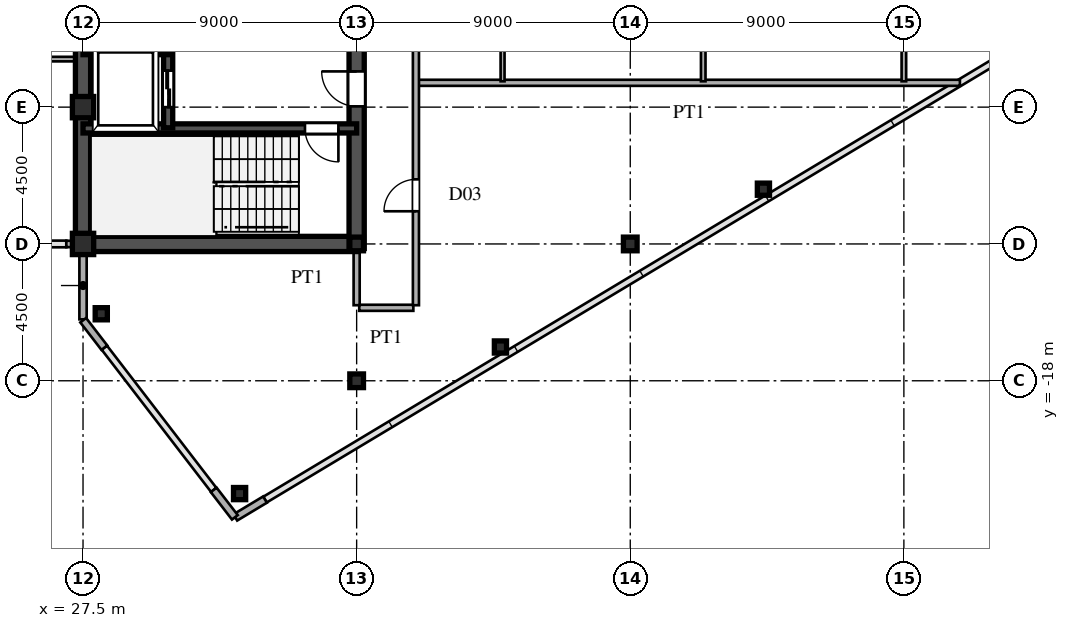
"""IFC4 building model, lengths in metres.
Left out: names, types, materials, properties, quantities, classifications, styles, units other than length and angle.
Written with IfcOpenShell. Run it as: python <this file> out.ifc"""

import sys

from ifc_helpers import new_model, si_unit, direction, frame, frame_2d, origin, origin_2d, place, context, subcontext, project, spatial, rectangle, hollow_rectangle, i_section, extrude, source, transform, mapped, element, fill, save


model = new_model("IFC4")
c1 = context("Model", 3, precision=1e-05, world=origin(), true_north=direction((0.0, 1.0)))
c2 = subcontext(c1, "Body", "Model", "MODEL_VIEW")
j1 = project(units=[si_unit("LENGTHUNIT", "METRE"), si_unit("PLANEANGLEUNIT", "RADIAN")], contexts=[c1])
p1 = place(None, origin())
s1 = spatial("IfcSite", under=j1, at=p1, CompositionType="ELEMENT")
p2 = place(p1, origin())
s2 = spatial("IfcBuilding", under=s1, at=p2, CompositionType="ELEMENT")
p3 = place(p2, frame((0.0, 0.0, 246.9)))
s3 = spatial("IfcBuildingStorey", under=s2, at=p3, CompositionType="ELEMENT", Elevation=246.9)
m1 = source(origin(), c2, "Body", "SweptSolid", [
    extrude(hollow_rectangle(XDim=0.7, YDim=0.7, WallThickness=0.03, at=origin_2d()), origin(), (0.0, 0.0, 1.0), 3.75),
])
for number, where, z_axis, x_axis in (
    (1, (27.5, -13.5, 0.0), (0.0, 0.0, 1.0), (1.0, 0.0, 0.0)),
    (2, (27.5, -9.0, 0.0), (0.0, 0.0, 1.0), (1.0, 0.0, 0.0)),
):
    element("IfcColumn", number, at=place(p3, frame(where, z_axis=z_axis, x_axis=x_axis)), inside=s3, PredefinedType="COLUMN", context=c2, shape_type="MappedRepresentation", body=[
        mapped(m1, transform((0.0, 0.0, 0.0), scale=1.0)),
    ])
m2 = source(origin(), c2, "Body", "SweptSolid", [
    extrude(i_section(OverallWidth=0.45, OverallDepth=0.45, WebThickness=0.016, FlangeThickness=0.025, at=origin_2d()), origin(), (0.0, 0.0, 1.0), 3.75),
])
for number, where, z_axis, x_axis in (
    (3, (36.5, -18.0, 0.0), (0.0, 0.0, 1.0), (1.0, 0.0, 0.0)),
    (4, (36.5, -13.5, 0.0), (0.0, 0.0, 1.0), (1.0, 0.0, 0.0)),
    (5, (45.5, -13.5, 0.0), (0.0, 0.0, 1.0), (1.0, 0.0, 0.0)),
):
    element("IfcColumn", number, at=place(p3, frame(where, z_axis=z_axis, x_axis=x_axis)), inside=s3, PredefinedType="COLUMN", context=c2, shape_type="MappedRepresentation", body=[
        mapped(m2, transform((0.0, 0.0, 0.0), scale=1.0)),
    ])
m3 = source(origin(), c2, "Body", "SweptSolid", [
    extrude(hollow_rectangle(XDim=0.4, YDim=0.4, WallThickness=0.016, at=origin_2d()), origin(), (0.0, 0.0, 1.0), 3.75),
])
for number, where, z_axis, x_axis in (
    (6, (32.65, -21.71, 0.0), (0.0, 0.0, 1.0), (1.0, 0.0, 0.0)),
    (7, (28.1, -15.796, 0.0), (0.0, 0.0, 1.0), (1.0, 0.0, 0.0)),
    (8, (41.23, -16.889, 0.0), (0.0, 0.0, 1.0), (1.0, 0.0, 0.0)),
    (9, (49.88, -11.699, 0.0), (0.0, 0.0, 1.0), (1.0, 0.0, 0.0)),
):
    element("IfcColumn", number, at=place(p3, frame(where, z_axis=z_axis, x_axis=x_axis)), inside=s3, PredefinedType="COLUMN", context=c2, shape_type="MappedRepresentation", body=[
        mapped(m3, transform((0.0, 0.0, 0.0), scale=1.0)),
    ])
p4 = place(p3, frame((32.509, -22.495, 0.0), z_axis=(0.0, 0.0, 1.0), x_axis=(0.85743623509, 0.514590228002, 0.0)))
e10 = element("IfcWall", 10, at=p4, inside=s3, PredefinedType="SOLIDWALL", context=c2, shape_type="SweptSolid", body=[
    extrude(rectangle(XDim=1.14, YDim=0.24, at=frame_2d((0.57, 0.0))), origin(), (0.0, 0.0, 1.0), 3.53),
])
p5 = place(p3, frame((27.5, -15.98, 0.0), z_axis=(0.0, 0.0, 1.0), x_axis=(0.0, 1.0, 0.0)))
e11 = element("IfcWall", 11, at=p5, inside=s3, PredefinedType="SOLIDWALL", context=c2, shape_type="SweptSolid", body=[
    extrude(rectangle(XDim=1.605, YDim=0.24, at=frame_2d((0.803, 0.0))), origin(), (0.0, 0.0, 1.0), 3.53),
])
p6 = place(p3, frame((27.5, -14.375, 0.0), z_axis=(0.0, 0.0, 1.0), x_axis=(0.0, 1.0, 0.0)))
e12 = element("IfcWall", 12, at=p6, inside=s3, PredefinedType="SOLIDWALL", context=c2, shape_type="SweptSolid", body=[
    extrude(rectangle(XDim=0.62, YDim=0.24, at=frame_2d((0.31, 0.0))), origin(), (0.0, 0.0, 1.0), 3.03),
])
for number, where, z_axis, x_axis in (
    (13, (27.506, -16.008, 0.0), (0.0, 0.0, 1.0), (0.61, -0.793, 0.0)),
    (14, (31.799, -21.588, 0.0), (0.0, 0.0, 1.0), (0.61, -0.793, 0.0)),
):
    element("IfcWall", number, at=place(p3, frame(where, z_axis=z_axis, x_axis=x_axis)), inside=s3, PredefinedType="SOLIDWALL", context=c2, shape_type="SweptSolid", body=[
        extrude(rectangle(XDim=1.14, YDim=0.24, at=frame_2d((0.57, 0.0))), origin(), (0.0, 0.0, 1.0), 3.53),
    ])
p7 = place(p3, frame((26.95, -13.5, 0.0), z_axis=(0.0, 0.0, 1.0), x_axis=(1.0, 0.0, 0.0)))
e15 = element("IfcWall", 15, at=p7, inside=s3, PredefinedType="SOLIDWALL", context=c2, shape_type="SweptSolid", body=[
    extrude(rectangle(XDim=0.54, YDim=0.21, at=frame_2d((0.27, 0.0))), origin(), (0.0, 0.0, 1.0), 3.03),
])
p8 = place(p3, frame((27.5, -13.5, 0.0), z_axis=(0.0, 0.0, 1.0), x_axis=(0.0, 1.0, 0.0)))
e16 = element("IfcWall", 16, at=p8, inside=s3, PredefinedType="SHEAR", context=c2, shape_type="SweptSolid", body=[
    extrude(rectangle(XDim=12.2, YDim=0.5, at=frame_2d((6.1, 0.0))), origin(), (0.0, 0.0, 1.0), 3.53),
])
p9 = place(p3, frame((27.5, -13.5, 0.0), z_axis=(0.0, 0.0, 1.0), x_axis=(1.0, 0.0, 0.0)))
e17 = element("IfcWall", 17, at=p9, inside=s3, PredefinedType="SHEAR", context=c2, shape_type="SweptSolid", body=[
    extrude(rectangle(XDim=9.0, YDim=0.5, at=frame_2d((4.5, 0.0))), origin(), (0.0, 0.0, 1.0), 3.53),
])
p10 = place(p3, frame((36.5, -13.65, 0.0), z_axis=(0.0, 0.0, 1.0), x_axis=(0.0, 1.0, 0.0)))
e18 = element("IfcWall", 18, at=p10, inside=s3, PredefinedType="SHEAR", context=c2, shape_type="SweptSolid", body=[
    extrude(rectangle(XDim=7.15, YDim=0.5, at=frame_2d((3.575, 0.0))), origin(), (0.0, 0.0, 1.0), 3.53),
])
p11 = place(p10, frame((4.675, 0.0, 0.0)))
e19 = element("IfcOpeningElement", 19, at=p11, cuts=e18, PredefinedType="OPENING", context=c2, shape_type="SweptSolid", body=[
    extrude(rectangle(XDim=1.15, YDim=2.2, at=frame_2d((0.575, 1.1))), frame((0.0, 0.26, 0.0), z_axis=(0.0, -1.0, 0.0), x_axis=(1.0, 0.0, 0.0)), (0.0, 0.0, 1.0), 0.52),
])
p12 = place(p3, frame((27.5, -9.7, 0.0), z_axis=(0.0, 0.0, 1.0), x_axis=(1.0, 0.0, 0.0)))
e20 = element("IfcWall", 20, at=p12, inside=s3, PredefinedType="SHEAR", context=c2, shape_type="SweptSolid", body=[
    extrude(rectangle(XDim=9.0, YDim=0.3, at=frame_2d((4.5, 0.0))), origin(), (0.0, 0.0, 1.0), 3.53),
])
p13 = place(p12, frame((7.3, 0.0, 0.0)))
e21 = element("IfcOpeningElement", 21, at=p13, cuts=e20, PredefinedType="OPENING", context=c2, shape_type="SweptSolid", body=[
    extrude(rectangle(XDim=1.1, YDim=2.2, at=frame_2d((0.55, 1.1))), frame((0.0, 0.16, 0.0), z_axis=(0.0, -1.0, 0.0), x_axis=(1.0, 0.0, 0.0)), (0.0, 0.0, 1.0), 0.32),
])
p14 = place(p3, frame((27.5, -7.15, 0.0), z_axis=(0.0, 0.0, 1.0), x_axis=(1.0, 0.0, 0.0)))
e22 = element("IfcWall", 22, at=p14, inside=s3, PredefinedType="SHEAR", context=c2, shape_type="SweptSolid", body=[
    extrude(rectangle(XDim=2.8, YDim=0.25, at=frame_2d((1.4, 0.0))), origin(), (0.0, 0.0, 1.0), 3.53),
])
p15 = place(p3, frame((30.3, -9.68, 0.0), z_axis=(0.0, 0.0, 1.0), x_axis=(0.0, 1.0, 0.0)))
e23 = element("IfcWall", 23, at=p15, inside=s3, PredefinedType="SHEAR", context=c2, shape_type="SweptSolid", body=[
    extrude(rectangle(XDim=2.56, YDim=0.3, at=frame_2d((1.28, 0.0))), origin(), (0.0, 0.0, 1.0), 3.53),
])
p16 = place(p15, frame((0.68, 0.0, 0.0)))
e24 = element("IfcOpeningElement", 24, at=p16, cuts=e23, PredefinedType="OPENING", context=c2, shape_type="SweptSolid", body=[
    extrude(rectangle(XDim=1.2, YDim=2.25, at=frame_2d((0.6, 1.125))), frame((0.0, 0.16, 0.0), z_axis=(0.0, -1.0, 0.0), x_axis=(1.0, 0.0, 0.0)), (0.0, 0.0, 1.0), 0.32),
])
p17 = place(p3, frame((36.585, -15.6, 0.0), z_axis=(0.0, 0.0, 1.0), x_axis=(1.0, 0.0, 0.0)))
e25 = element("IfcWall", 25, at=p17, inside=s3, PredefinedType="PARTITIONING", context=c2, shape_type="SweptSolid", body=[
    extrude(rectangle(XDim=1.78, YDim=0.2, at=frame_2d((0.89, 0.0))), origin(), (0.0, 0.0, 1.0), 3.53),
])
p18 = place(p3, frame((38.53, -8.2, 0.0), z_axis=(0.0, 0.0, 1.0), x_axis=(1.0, 0.0, 0.0)))
e26 = element("IfcWall", 26, at=p18, inside=s3, PredefinedType="PARTITIONING", context=c2, shape_type="SweptSolid", body=[
    extrude(rectangle(XDim=17.813, YDim=0.2, at=frame_2d((8.906, 0.0))), origin(), (0.0, 0.0, 1.0), 3.53),
])
p19 = place(p3, frame((7.085, -7.42, 0.0), z_axis=(0.0, 0.0, 1.0), x_axis=(1.0, 0.0, 0.0)))
e27 = element("IfcWall", 27, at=p19, inside=s3, PredefinedType="PARTITIONING", context=c2, shape_type="SweptSolid", body=[
    extrude(rectangle(XDim=20.16, YDim=0.15, at=frame_2d((10.08, 0.0))), origin(), (0.0, 0.0, 1.0), 3.53),
])
p20 = place(p19, frame((3.44, 0.0, 0.0)))
e28 = element("IfcOpeningElement", 28, at=p20, cuts=e27, PredefinedType="OPENING", context=c2, shape_type="SweptSolid", body=[
    extrude(rectangle(XDim=0.95, YDim=2.15, at=frame_2d((0.475, 1.075))), frame((0.0, 0.085, 0.0), z_axis=(0.0, -1.0, 0.0), x_axis=(1.0, 0.0, 0.0)), (0.0, 0.0, 1.0), 0.17),
])
p21 = place(p19, frame((10.69, 0.0, 0.0)))
e29 = element("IfcOpeningElement", 29, at=p21, cuts=e27, PredefinedType="OPENING", context=c2, shape_type="SweptSolid", body=[
    extrude(rectangle(XDim=0.95, YDim=2.15, at=frame_2d((0.475, 1.075))), frame((0.0, 0.085, 0.0), z_axis=(0.0, -1.0, 0.0), x_axis=(1.0, 0.0, 0.0)), (0.0, 0.0, 1.0), 0.17),
])
p22 = place(p19, frame((16.94, 0.0, 0.0)))
e30 = element("IfcOpeningElement", 30, at=p22, cuts=e27, PredefinedType="OPENING", context=c2, shape_type="SweptSolid", body=[
    extrude(rectangle(XDim=0.95, YDim=2.15, at=frame_2d((0.475, 1.075))), frame((0.0, 0.085, 0.0), z_axis=(0.0, -1.0, 0.0), x_axis=(1.0, 0.0, 0.0)), (0.0, 0.0, 1.0), 0.17),
])
p23 = place(p3, frame((36.5, -15.515, 0.0), z_axis=(0.0, 0.0, 1.0), x_axis=(0.0, 1.0, 0.0)))
e31 = element("IfcWall", 31, at=p23, inside=s3, PredefinedType="PARTITIONING", context=c2, shape_type="SweptSolid", body=[
    extrude(rectangle(XDim=1.76, YDim=0.2, at=frame_2d((0.88, 0.0))), origin(), (0.0, 0.0, 1.0), 2.93),
])
p24 = place(p3, frame((38.45, -15.515, 0.0), z_axis=(0.0, 0.0, 1.0), x_axis=(0.0, 1.0, 0.0)))
e32 = element("IfcWall", 32, at=p24, inside=s3, PredefinedType="PARTITIONING", context=c2, shape_type="SweptSolid", body=[
    extrude(rectangle(XDim=31.03, YDim=0.2, at=frame_2d((15.515, 0.0))), origin(), (0.0, 0.0, 1.0), 3.53),
])
p25 = place(p24, frame((3.09, 0.0, 0.0)))
e33 = element("IfcOpeningElement", 33, at=p25, cuts=e32, PredefinedType="OPENING", context=c2, shape_type="SweptSolid", body=[
    extrude(rectangle(XDim=1.05, YDim=2.25, at=frame_2d((0.525, 1.125))), frame((0.0, 0.11, 0.0), z_axis=(0.0, -1.0, 0.0), x_axis=(1.0, 0.0, 0.0)), (0.0, 0.0, 1.0), 0.22),
])
p26 = place(p24, frame((13.095, 0.0, 0.0)))
e34 = element("IfcOpeningElement", 34, at=p26, cuts=e32, PredefinedType="OPENING", context=c2, shape_type="SweptSolid", body=[
    extrude(rectangle(XDim=1.05, YDim=2.25, at=frame_2d((0.525, 1.125))), frame((0.0, 0.11, 0.0), z_axis=(0.0, -1.0, 0.0), x_axis=(1.0, 0.0, 0.0)), (0.0, 0.0, 1.0), 0.22),
])
p27 = place(p24, frame((25.19, 0.0, 0.0)))
e35 = element("IfcOpeningElement", 35, at=p27, cuts=e32, PredefinedType="OPENING", context=c2, shape_type="SweptSolid", body=[
    extrude(rectangle(XDim=1.05, YDim=2.25, at=frame_2d((0.525, 1.125))), frame((0.0, 0.11, 0.0), z_axis=(0.0, -1.0, 0.0), x_axis=(1.0, 0.0, 0.0)), (0.0, 0.0, 1.0), 0.22),
])
p28 = place(p3, frame((41.3, -8.15, 0.0), z_axis=(0.0, 0.0, 1.0), x_axis=(0.0, 1.0, 0.0)))
e36 = element("IfcWall", 36, at=p28, inside=s3, PredefinedType="PARTITIONING", context=c2, shape_type="SweptSolid", body=[
    extrude(rectangle(XDim=3.408, YDim=0.13, at=frame_2d((1.704, 0.0))), origin(), (0.0, 0.0, 1.0), 3.53),
])
p29 = place(p3, frame((47.9, -8.15, 0.0), z_axis=(0.0, 0.0, 1.0), x_axis=(0.0, 1.0, 0.0)))
e37 = element("IfcWall", 37, at=p29, inside=s3, PredefinedType="PARTITIONING", context=c2, shape_type="SweptSolid", body=[
    extrude(rectangle(XDim=12.9, YDim=0.15, at=frame_2d((6.45, 0.0))), origin(), (0.0, 0.0, 1.0), 3.53),
])
p30 = place(p29, frame((5.975, 0.0, 0.0)))
e38 = element("IfcOpeningElement", 38, at=p30, cuts=e37, PredefinedType="OPENING", context=c2, shape_type="SweptSolid", body=[
    extrude(rectangle(XDim=0.95, YDim=2.15, at=frame_2d((0.475, 1.075))), frame((0.0, 0.085, 0.0), z_axis=(0.0, -1.0, 0.0), x_axis=(1.0, 0.0, 0.0)), (0.0, 0.0, 1.0), 0.17),
])
p31 = place(p29, frame((1.642, 0.0, 0.0)))
e39 = element("IfcOpeningElement", 39, at=p31, cuts=e37, PredefinedType="OPENING", context=c2, shape_type="SweptSolid", body=[
    extrude(rectangle(XDim=0.95, YDim=2.15, at=frame_2d((0.475, 1.075))), frame((0.0, 0.085, 0.0), z_axis=(0.0, -1.0, 0.0), x_axis=(1.0, 0.0, 0.0)), (0.0, 0.0, 1.0), 0.17),
])
p32 = place(p3, frame((54.5, -8.15, 0.0), z_axis=(0.0, 0.0, 1.0), x_axis=(0.0, 1.0, 0.0)))
e40 = element("IfcWall", 40, at=p32, inside=s3, PredefinedType="PARTITIONING", context=c2, shape_type="SweptSolid", body=[
    extrude(rectangle(XDim=12.9, YDim=0.15, at=frame_2d((6.45, 0.0))), origin(), (0.0, 0.0, 1.0), 2.93),
])
p33 = place(p32, frame((5.975, 0.0, 0.0)))
e41 = element("IfcOpeningElement", 41, at=p33, cuts=e40, PredefinedType="OPENING", context=c2, shape_type="SweptSolid", body=[
    extrude(rectangle(XDim=0.95, YDim=2.15, at=frame_2d((0.475, 1.075))), frame((0.0, 0.085, 0.0), z_axis=(0.0, -1.0, 0.0), x_axis=(1.0, 0.0, 0.0)), (0.0, 0.0, 1.0), 0.17),
])
p34 = place(p32, frame((1.642, 0.0, 0.0)))
e42 = element("IfcOpeningElement", 42, at=p34, cuts=e40, PredefinedType="OPENING", context=c2, shape_type="SweptSolid", body=[
    extrude(rectangle(XDim=0.95, YDim=2.15, at=frame_2d((0.475, 1.075))), frame((0.0, 0.085, 0.0), z_axis=(0.0, -1.0, 0.0), x_axis=(1.0, 0.0, 0.0)), (0.0, 0.0, 1.0), 0.17),
])
p35 = place(p32, frame((10.308, 0.0, 0.0)))
e43 = element("IfcOpeningElement", 43, at=p35, cuts=e40, PredefinedType="OPENING", context=c2, shape_type="SweptSolid", body=[
    extrude(rectangle(XDim=0.95, YDim=2.15, at=frame_2d((0.475, 1.075))), frame((0.0, 0.085, 0.0), z_axis=(0.0, -1.0, 0.0), x_axis=(1.0, 0.0, 0.0)), (0.0, 0.0, 1.0), 0.17),
])
m4 = source(origin(), c2, "Body", "SweptSolid", [
    extrude(rectangle(XDim=1.15, YDim=2.2, at=frame_2d((0.575, 1.1))), frame((0.0, 0.025, 0.0), z_axis=(0.0, -1.0, 0.0), x_axis=(1.0, 0.0, 0.0)), (0.0, 0.0, 1.0), 0.05),
])
p36 = place(p11, origin())
e44 = element("IfcDoor", 44, at=p36, inside=s3, OperationType="SINGLE_SWING_RIGHT", PredefinedType="DOOR", context=c2, shape_type="MappedRepresentation", body=[
    mapped(m4, transform((0.0, 0.0, 0.0), scale=1.0)),
])
fill(e19, e44)
m5 = source(origin(), c2, "Body", "SweptSolid", [
    extrude(rectangle(XDim=1.1, YDim=2.2, at=frame_2d((0.55, 1.1))), frame((0.0, 0.025, 0.0), z_axis=(0.0, -1.0, 0.0), x_axis=(1.0, 0.0, 0.0)), (0.0, 0.0, 1.0), 0.05),
])
p37 = place(p13, frame((1.1, 0.0, 0.0), z_axis=(0.0, 0.0, 1.0), x_axis=(-1.0, 0.0, 0.0)))
e45 = element("IfcDoor", 45, at=p37, inside=s3, OperationType="SINGLE_SWING_RIGHT", PredefinedType="DOOR", context=c2, shape_type="MappedRepresentation", body=[
    mapped(m5, transform((0.0, 0.0, 0.0), scale=1.0)),
])
fill(e21, e45)
m6 = source(origin(), c2, "Body", "SweptSolid", [
    extrude(rectangle(XDim=1.2, YDim=2.25, at=frame_2d((0.6, 1.125))), frame((0.0, 0.025, 0.0), z_axis=(0.0, -1.0, 0.0), x_axis=(1.0, 0.0, 0.0)), (0.0, 0.0, 1.0), 0.05),
])
p38 = place(p16, origin())
e46 = element("IfcDoor", 46, at=p38, inside=s3, OperationType="DOUBLE_DOOR_SLIDING", PredefinedType="DOOR", context=c2, shape_type="MappedRepresentation", body=[
    mapped(m6, transform((0.0, 0.0, 0.0), scale=1.0)),
])
fill(e24, e46)
m7 = source(origin(), c2, "Body", "SweptSolid", [
    extrude(rectangle(XDim=1.05, YDim=2.25, at=frame_2d((0.525, 1.125))), frame((0.0, 0.025, 0.0), z_axis=(0.0, -1.0, 0.0), x_axis=(1.0, 0.0, 0.0)), (0.0, 0.0, 1.0), 0.05),
])
p39 = place(p25, origin())
e47 = element("IfcDoor", 47, at=p39, inside=s3, OperationType="SINGLE_SWING_LEFT", PredefinedType="DOOR", context=c2, shape_type="MappedRepresentation", body=[
    mapped(m7, transform((0.0, 0.0, 0.0), scale=1.0)),
])
fill(e33, e47)
save(model, sys.argv[1])
